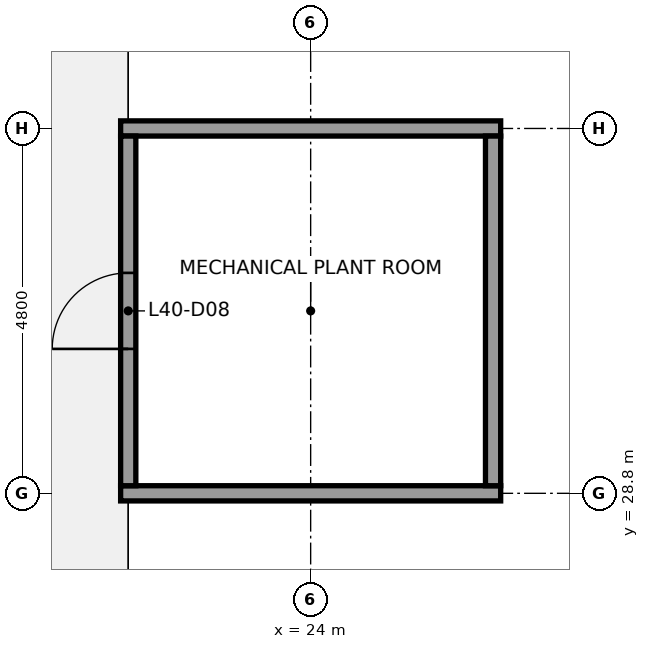
"""IFC4 building model, lengths in metres.
Left out: names, types, materials, properties, quantities, classifications, styles, units other than length and angle.
Written with IfcOpenShell. Run it as: python <this file> out.ifc"""

import sys

from ifc_helpers import new_model, si_unit, direction, frame, frame_2d, origin, place, context, subcontext, project, spatial, rectangle, extrude, element, fill, save


model = new_model("IFC4")
c1 = context("Model", 3, precision=1e-05, world=origin(), true_north=direction((0.0, 1.0)))
c2 = subcontext(c1, "Body", "Model", "MODEL_VIEW")
j1 = project(units=[si_unit("LENGTHUNIT", "METRE"), si_unit("PLANEANGLEUNIT", "RADIAN")], contexts=[c1])
p1 = place(None, origin())
s1 = spatial("IfcSite", under=j1, at=p1, CompositionType="ELEMENT")
p2 = place(p1, origin())
s2 = spatial("IfcBuilding", under=s1, at=p2, CompositionType="ELEMENT")
p3 = place(p2, frame((0.0, 0.0, 180.6)))
s3 = spatial("IfcBuildingStorey", under=s2, at=p3, CompositionType="ELEMENT", Elevation=180.6)
for number, where, z_axis, x_axis in (
    (1, (21.5, 28.8, 0.0), (0.0, 0.0, 1.0), (1.0, 0.0, 0.0)),
    (2, (21.5, 33.6, 0.0), (0.0, 0.0, 1.0), (1.0, 0.0, 0.0)),
):
    element("IfcWall", number, at=place(p3, frame(where, z_axis=z_axis, x_axis=x_axis)), inside=s3, PredefinedType="PARTITIONING", context=c2, shape_type="SweptSolid", body=[
        extrude(rectangle(XDim=5.0, YDim=0.2, at=frame_2d((2.5, 0.0))), origin(), (0.0, 0.0, 1.0), 11.309),
    ])
p4 = place(p3, frame((21.6, 28.9, 0.0), z_axis=(0.0, 0.0, 1.0), x_axis=(0.0, 1.0, 0.0)))
e3 = element("IfcWall", 3, at=p4, inside=s3, PredefinedType="PARTITIONING", context=c2, shape_type="SweptSolid", body=[
    extrude(rectangle(XDim=4.6, YDim=0.2, at=frame_2d((2.3, 0.0))), origin(), (0.0, 0.0, 1.0), 11.309),
])
p5 = place(p4, frame((1.8, 0.0, 0.0)))
e4 = element("IfcOpeningElement", 4, at=p5, cuts=e3, PredefinedType="OPENING", context=c2, shape_type="SweptSolid", body=[
    extrude(rectangle(XDim=1.0, YDim=2.1, at=frame_2d((0.5, 1.05))), frame((0.0, 0.11, 0.0), z_axis=(0.0, -1.0, 0.0), x_axis=(1.0, 0.0, 0.0)), (0.0, 0.0, 1.0), 0.22),
])
p6 = place(p3, frame((26.4, 28.9, 0.0), z_axis=(0.0, 0.0, 1.0), x_axis=(0.0, 1.0, 0.0)))
e5 = element("IfcWall", 5, at=p6, inside=s3, PredefinedType="PARTITIONING", context=c2, shape_type="SweptSolid", body=[
    extrude(rectangle(XDim=4.6, YDim=0.2, at=frame_2d((2.3, 0.0))), origin(), (0.0, 0.0, 1.0), 11.309),
])
p7 = place(p5, origin())
e6 = element("IfcDoor", 6, at=p7, inside=s3, OperationType="SINGLE_SWING_LEFT", PredefinedType="DOOR", context=c2, shape_type="SweptSolid", body=[
    extrude(rectangle(XDim=1.0, YDim=2.1, at=frame_2d((0.5, 1.05))), frame((0.0, 0.025, 0.0), z_axis=(0.0, -1.0, 0.0), x_axis=(1.0, 0.0, 0.0)), (0.0, 0.0, 1.0), 0.05),
])
fill(e4, e6)
save(model, sys.argv[1])
